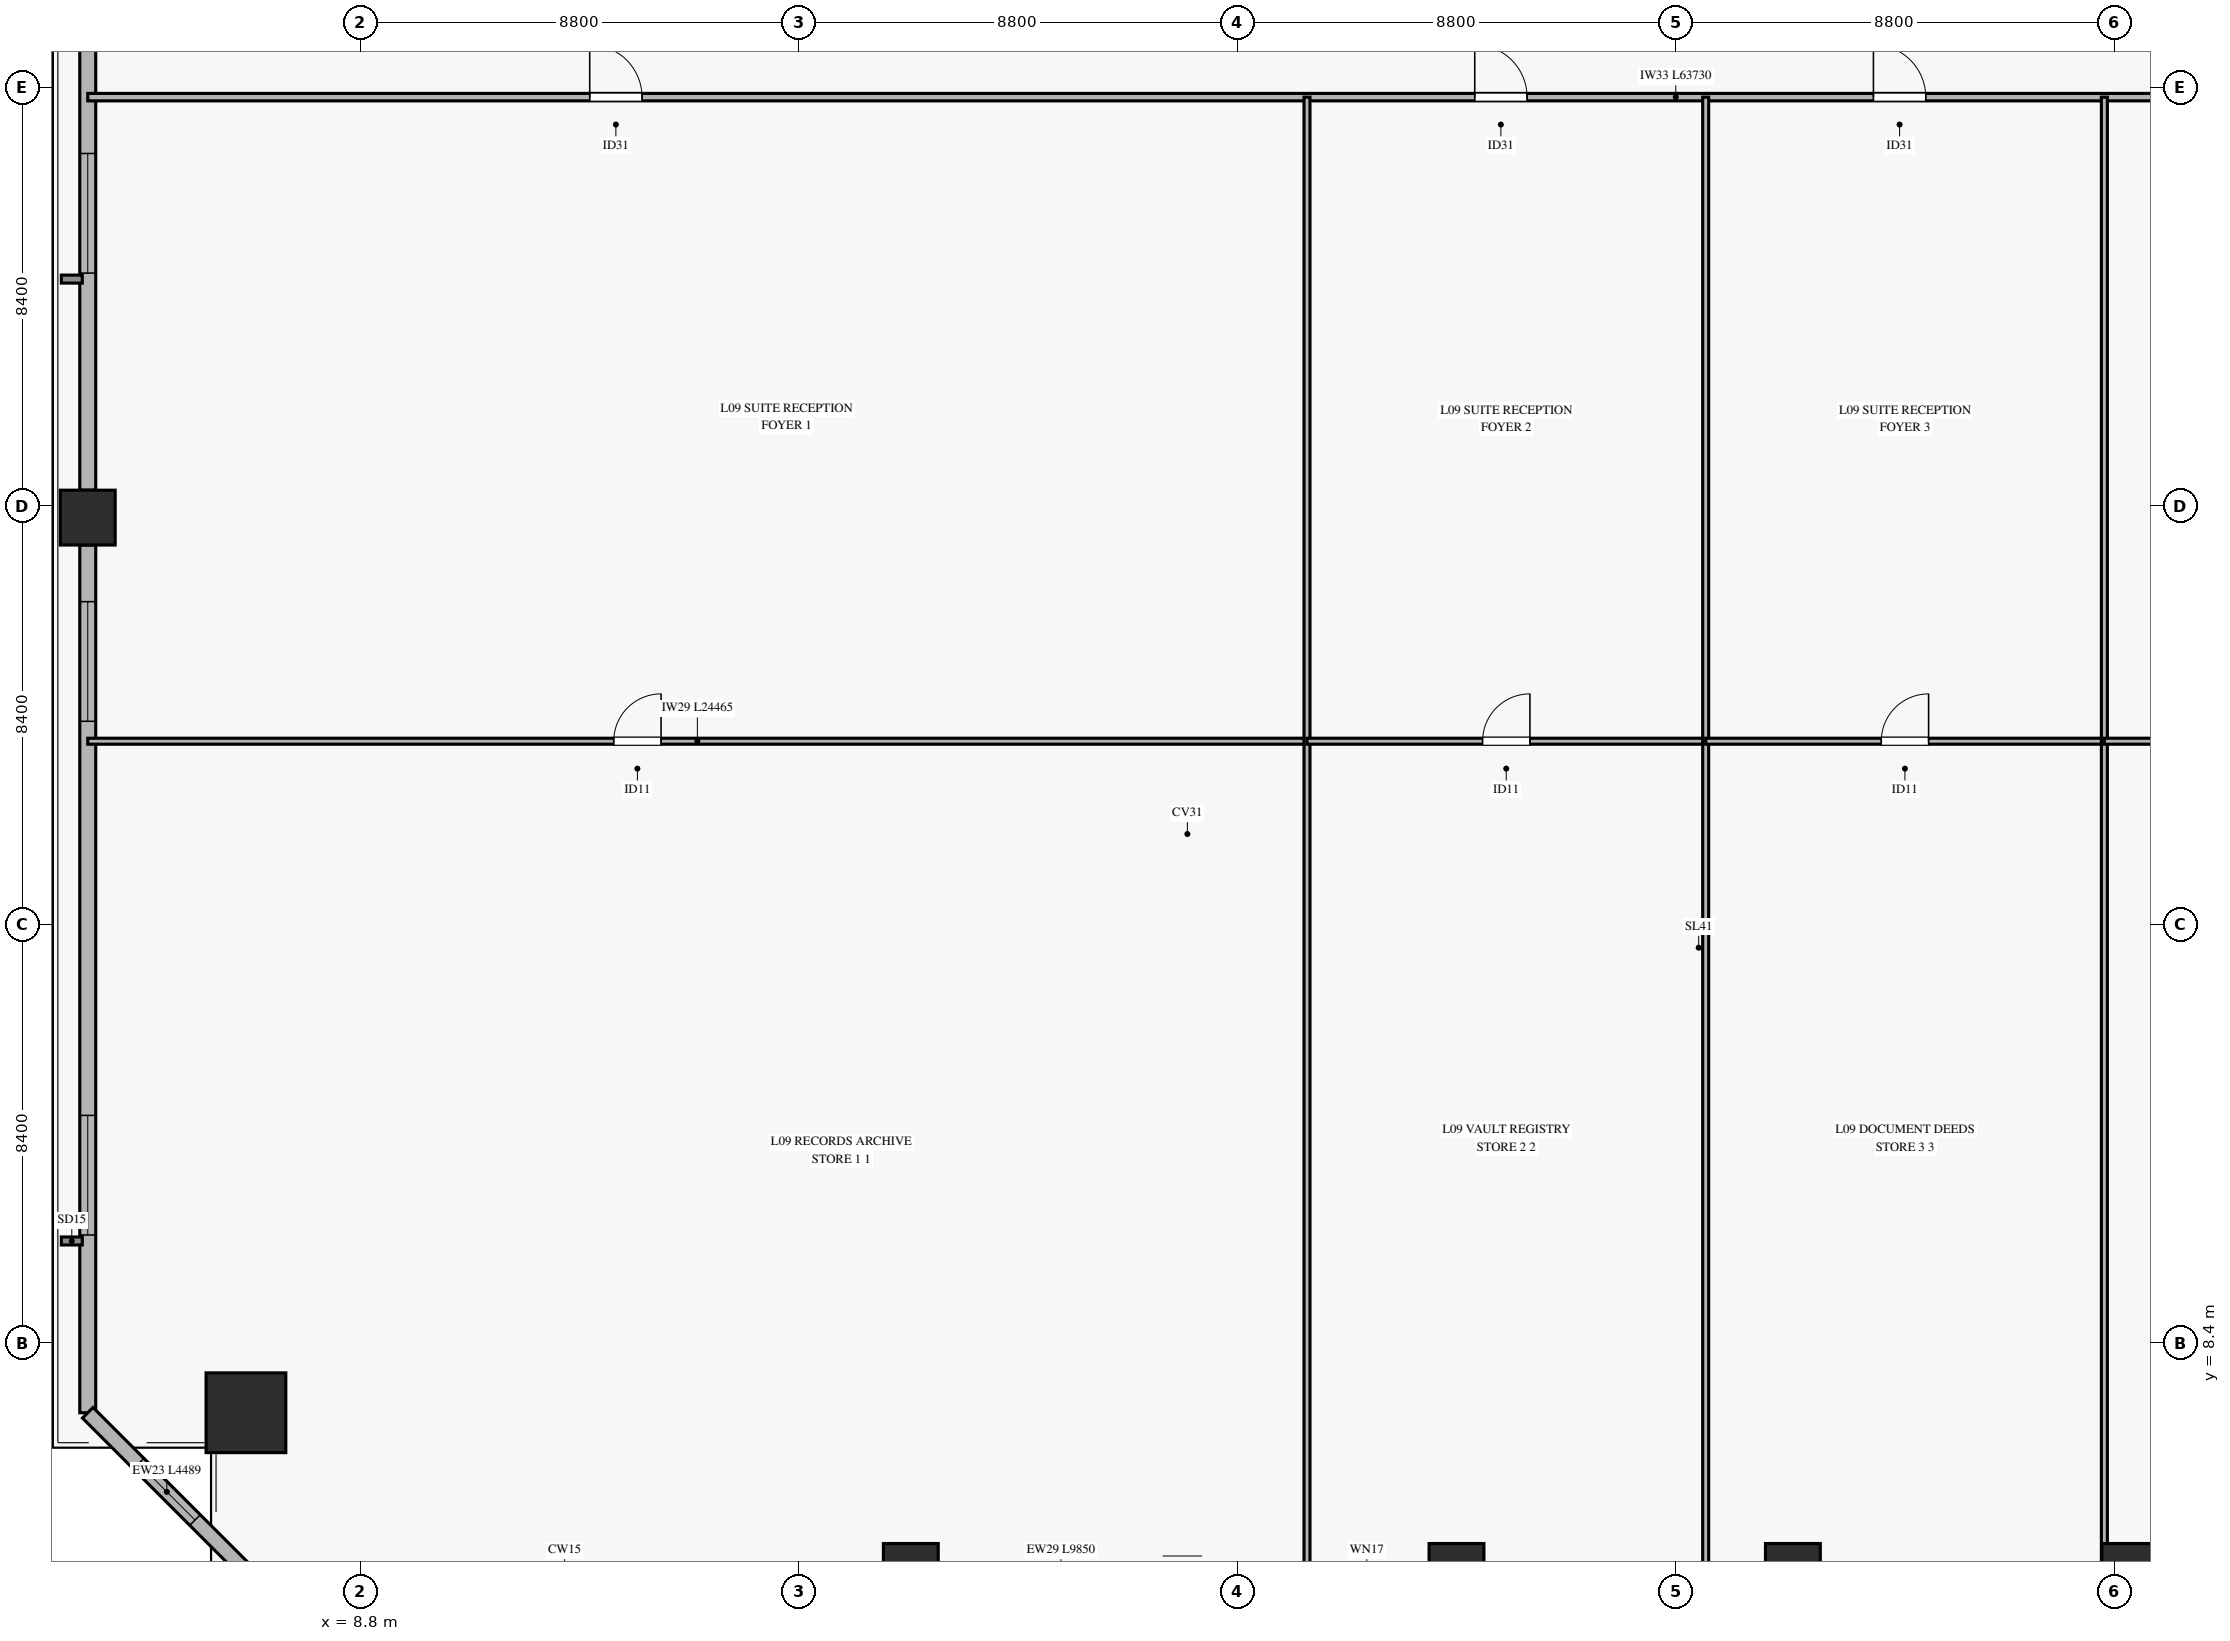
"""IFC4 building model, lengths in metres.
Left out: names, types, materials, properties, quantities, classifications, styles, units other than length and angle.
Written with IfcOpenShell. Run it as: python <this file> out.ifc"""

import sys

from ifc_helpers import new_model, si_unit, direction, frame, frame_2d, origin, origin_2d, place, context, subcontext, project, spatial, rectangle, hollow_rectangle, extrude, source, transform, mapped, element, fill, save


model = new_model("IFC4")
c1 = context("Model", 3, precision=1e-05, world=origin(), true_north=direction((0.0, 1.0)))
c2 = subcontext(c1, "Body", "Model", "MODEL_VIEW")
j1 = project(units=[si_unit("LENGTHUNIT", "METRE"), si_unit("PLANEANGLEUNIT", "RADIAN")], contexts=[c1])
p1 = place(None, origin())
s1 = spatial("IfcSite", under=j1, at=p1, CompositionType="ELEMENT")
p2 = place(p1, origin())
s2 = spatial("IfcBuilding", under=s1, at=p2, CompositionType="ELEMENT")
p3 = place(p2, frame((0.0, 0.0, 37.1)))
s3 = spatial("IfcBuildingStorey", under=s2, at=p3, CompositionType="ELEMENT", Elevation=37.1)
m1 = source(origin(), c2, "Body", "SweptSolid", [
    extrude(hollow_rectangle(XDim=1.6, YDim=1.6, WallThickness=0.075, at=origin_2d()), origin(), (0.0, 0.0, 1.0), 3.68),
])
p4 = place(p3, frame((6.509, 7.001, 0.0), z_axis=(0.0, 0.0, 1.0), x_axis=(1.0, 0.0, 0.0)))
e1 = element("IfcColumn", 1, at=p4, inside=s3, PredefinedType="COLUMN", context=c2, shape_type="MappedRepresentation", body=[
    mapped(m1, transform((0.0, 0.0, 0.0), x_axis=(1.0, 0.0, 0.0), y_axis=(0.0, 1.0, 0.0), z_axis=(0.0, 0.0, 1.0), scale=1.0)),
])
m2 = source(origin(), c2, "Body", "SweptSolid", [
    extrude(hollow_rectangle(XDim=1.1, YDim=1.1, WallThickness=0.05, at=origin_2d()), origin(), (0.0, 0.0, 1.0), 3.68),
])
for number, where, z_axis, x_axis in (
    (2, (19.85, 3.827, 0.0), (0.0, 0.0, 1.0), (1.0, 0.0, 0.0)),
    (3, (30.8, 3.827, 0.0), (0.0, 0.0, 1.0), (1.0, 0.0, 0.0)),
    (4, (37.55, 3.827, 0.0), (0.0, 0.0, 1.0), (1.0, 0.0, 0.0)),
    (5, (44.3, 3.827, 0.0), (0.0, 0.0, 1.0), (1.0, 0.0, 0.0)),
    (6, (3.335, 24.963, 0.0), (0.0, 0.0, 1.0), (1.0, 0.0, 0.0)),
):
    element("IfcColumn", number, at=place(p3, frame(where, z_axis=z_axis, x_axis=x_axis)), inside=s3, PredefinedType="COLUMN", context=c2, shape_type="MappedRepresentation", body=[
        mapped(m2, transform((0.0, 0.0, 0.0), x_axis=(1.0, 0.0, 0.0), y_axis=(0.0, 1.0, 0.0), z_axis=(0.0, 0.0, 1.0), scale=1.0)),
    ])
p5 = place(p3, frame((3.335, 7.001, 0.0), z_axis=(0.0, 0.0, 1.0), x_axis=(0.0, 1.0, 0.0)))
e7 = element("IfcWall", 7, at=p5, inside=s3, PredefinedType="SOLIDWALL", context=c2, shape_type="SweptSolid", body=[
    extrude(rectangle(XDim=17.412, YDim=0.32, at=frame_2d((8.706, 0.0))), origin(), (0.0, 0.0, 1.0), 3.16),
])
p6 = place(p5, frame((3.567, 0.0, 0.45)))
e8 = element("IfcOpeningElement", 8, at=p6, cuts=e7, PredefinedType="OPENING", context=c2, shape_type="SweptSolid", body=[
    extrude(rectangle(XDim=2.4, YDim=2.1, at=frame_2d((1.2, 1.05))), frame((0.0, 0.17, 0.0), z_axis=(0.0, -1.0, 0.0), x_axis=(1.0, 0.0, 0.0)), (0.0, 0.0, 1.0), 0.34),
])
p7 = place(p5, frame((13.875, 0.0, 0.45)))
e9 = element("IfcOpeningElement", 9, at=p7, cuts=e7, PredefinedType="OPENING", context=c2, shape_type="SweptSolid", body=[
    extrude(rectangle(XDim=2.4, YDim=2.1, at=frame_2d((1.2, 1.05))), frame((0.0, 0.17, 0.0), z_axis=(0.0, -1.0, 0.0), x_axis=(1.0, 0.0, 0.0)), (0.0, 0.0, 1.0), 0.34),
])
p8 = place(p3, frame((3.335, 25.513, 0.0), z_axis=(0.0, 0.0, 1.0), x_axis=(0.0, 1.0, 0.0)))
e10 = element("IfcWall", 10, at=p8, inside=s3, PredefinedType="SOLIDWALL", context=c2, shape_type="SweptSolid", body=[
    extrude(rectangle(XDim=17.413, YDim=0.32, at=frame_2d((8.707, 0.0))), origin(), (0.0, 0.0, 1.0), 3.16),
])
p9 = place(p8, frame((4.356, 0.0, 0.45)))
e11 = element("IfcOpeningElement", 11, at=p9, cuts=e10, PredefinedType="OPENING", context=c2, shape_type="SweptSolid", body=[
    extrude(rectangle(XDim=2.4, YDim=2.1, at=frame_2d((1.2, 1.05))), frame((0.0, 0.17, 0.0), z_axis=(0.0, -1.0, 0.0), x_axis=(1.0, 0.0, 0.0)), (0.0, 0.0, 1.0), 0.34),
])
p10 = place(p3, frame((3.335, 7.001, 0.0), z_axis=(0.0, 0.0, 1.0), x_axis=(0.707106781187, -0.707106781187, 0.0)))
e12 = element("IfcWall", 12, at=p10, inside=s3, PredefinedType="SOLIDWALL", context=c2, shape_type="SweptSolid", body=[
    extrude(rectangle(XDim=4.489, YDim=0.3, at=frame_2d((2.244, 0.0))), origin(), (0.0, 0.0, 1.0), 3.16),
])
p11 = place(p10, frame((1.444, 0.0, 0.45)))
e13 = element("IfcOpeningElement", 13, at=p11, cuts=e12, PredefinedType="OPENING", context=c2, shape_type="SweptSolid", body=[
    extrude(rectangle(XDim=1.6, YDim=2.0, at=frame_2d((0.8, 1.0))), frame((0.0, 0.16, 0.0), z_axis=(0.0, -1.0, 0.0), x_axis=(1.0, 0.0, 0.0)), (0.0, 0.0, 1.0), 0.32),
])
p12 = place(p3, frame((3.335, 33.4, 0.0), z_axis=(0.0, 0.0, 1.0), x_axis=(1.0, 0.0, 0.0)))
e14 = element("IfcWall", 14, at=p12, inside=s3, PredefinedType="PARTITIONING", context=c2, shape_type="SweptSolid", body=[
    extrude(rectangle(XDim=63.73, YDim=0.15, at=frame_2d((31.865, 0.0))), origin(), (0.0, 0.0, 1.0), 2.765),
])
p13 = place(p12, frame((10.072, 0.0, 0.0)))
e15 = element("IfcOpeningElement", 15, at=p13, cuts=e14, PredefinedType="OPENING", context=c2, shape_type="SweptSolid", body=[
    extrude(rectangle(XDim=1.05, YDim=2.15, at=frame_2d((0.525, 1.075))), frame((0.0, 0.085, 0.0), z_axis=(0.0, -1.0, 0.0), x_axis=(1.0, 0.0, 0.0)), (0.0, 0.0, 1.0), 0.17),
])
p14 = place(p12, frame((27.831, 0.0, 0.0)))
e16 = element("IfcOpeningElement", 16, at=p14, cuts=e14, PredefinedType="OPENING", context=c2, shape_type="SweptSolid", body=[
    extrude(rectangle(XDim=1.05, YDim=2.15, at=frame_2d((0.525, 1.075))), frame((0.0, 0.085, 0.0), z_axis=(0.0, -1.0, 0.0), x_axis=(1.0, 0.0, 0.0)), (0.0, 0.0, 1.0), 0.17),
])
p15 = place(p12, frame((35.831, 0.0, 0.0)))
e17 = element("IfcOpeningElement", 17, at=p15, cuts=e14, PredefinedType="OPENING", context=c2, shape_type="SweptSolid", body=[
    extrude(rectangle(XDim=1.05, YDim=2.15, at=frame_2d((0.525, 1.075))), frame((0.0, 0.085, 0.0), z_axis=(0.0, -1.0, 0.0), x_axis=(1.0, 0.0, 0.0)), (0.0, 0.0, 1.0), 0.17),
])
p16 = place(p12, frame((49.857, 0.0, 0.0)))
e18 = element("IfcOpeningElement", 18, at=p16, cuts=e14, PredefinedType="OPENING", context=c2, shape_type="SweptSolid", body=[
    extrude(rectangle(XDim=1.05, YDim=2.15, at=frame_2d((0.525, 1.075))), frame((0.0, 0.085, 0.0), z_axis=(0.0, -1.0, 0.0), x_axis=(1.0, 0.0, 0.0)), (0.0, 0.0, 1.0), 0.17),
])
p17 = place(p3, frame((3.335, 20.476, 0.0), z_axis=(0.0, 0.0, 1.0), x_axis=(1.0, 0.0, 0.0)))
e19 = element("IfcWall", 19, at=p17, inside=s3, PredefinedType="PARTITIONING", context=c2, shape_type="SweptSolid", body=[
    extrude(rectangle(XDim=24.465, YDim=0.12, at=frame_2d((12.232, 0.0))), origin(), (0.0, 0.0, 1.0), 2.765),
])
p18 = place(p17, frame((10.554, 0.0, 0.0)))
e20 = element("IfcOpeningElement", 20, at=p18, cuts=e19, PredefinedType="OPENING", context=c2, shape_type="SweptSolid", body=[
    extrude(rectangle(XDim=0.95, YDim=2.1, at=frame_2d((0.475, 1.05))), frame((0.0, 0.07, 0.0), z_axis=(0.0, -1.0, 0.0), x_axis=(1.0, 0.0, 0.0)), (0.0, 0.0, 1.0), 0.14),
])
p19 = place(p3, frame((27.8, 3.827, 0.0), z_axis=(0.0, 0.0, 1.0), x_axis=(0.0, 1.0, 0.0)))
e21 = element("IfcWall", 21, at=p19, inside=s3, PredefinedType="PARTITIONING", context=c2, shape_type="SweptSolid", body=[
    extrude(rectangle(XDim=29.573, YDim=0.12, at=frame_2d((14.787, 0.0))), origin(), (0.0, 0.0, 1.0), 3.165),
])
p20 = place(p3, frame((27.8, 20.476, 0.0), z_axis=(0.0, 0.0, 1.0), x_axis=(1.0, 0.0, 0.0)))
e22 = element("IfcWall", 22, at=p20, inside=s3, PredefinedType="PARTITIONING", context=c2, shape_type="SweptSolid", body=[
    extrude(rectangle(XDim=8.0, YDim=0.12, at=frame_2d((4.0, 0.0))), origin(), (0.0, 0.0, 1.0), 2.765),
])
p21 = place(p20, frame((3.523, 0.0, 0.0)))
e23 = element("IfcOpeningElement", 23, at=p21, cuts=e22, PredefinedType="OPENING", context=c2, shape_type="SweptSolid", body=[
    extrude(rectangle(XDim=0.95, YDim=2.1, at=frame_2d((0.475, 1.05))), frame((0.0, 0.07, 0.0), z_axis=(0.0, -1.0, 0.0), x_axis=(1.0, 0.0, 0.0)), (0.0, 0.0, 1.0), 0.14),
])
p22 = place(p3, frame((35.8, 3.827, 0.0), z_axis=(0.0, 0.0, 1.0), x_axis=(0.0, 1.0, 0.0)))
e24 = element("IfcWall", 24, at=p22, inside=s3, PredefinedType="PARTITIONING", context=c2, shape_type="SweptSolid", body=[
    extrude(rectangle(XDim=29.573, YDim=0.12, at=frame_2d((14.787, 0.0))), origin(), (0.0, 0.0, 1.0), 3.165),
])
p23 = place(p3, frame((35.8, 20.476, 0.0), z_axis=(0.0, 0.0, 1.0), x_axis=(1.0, 0.0, 0.0)))
e25 = element("IfcWall", 25, at=p23, inside=s3, PredefinedType="PARTITIONING", context=c2, shape_type="SweptSolid", body=[
    extrude(rectangle(XDim=8.0, YDim=0.12, at=frame_2d((4.0, 0.0))), origin(), (0.0, 0.0, 1.0), 2.765),
])
p24 = place(p23, frame((3.523, 0.0, 0.0)))
e26 = element("IfcOpeningElement", 26, at=p24, cuts=e25, PredefinedType="OPENING", context=c2, shape_type="SweptSolid", body=[
    extrude(rectangle(XDim=0.95, YDim=2.1, at=frame_2d((0.475, 1.05))), frame((0.0, 0.07, 0.0), z_axis=(0.0, -1.0, 0.0), x_axis=(1.0, 0.0, 0.0)), (0.0, 0.0, 1.0), 0.14),
])
p25 = place(p3, frame((43.8, 3.827, 0.0), z_axis=(0.0, 0.0, 1.0), x_axis=(0.0, 1.0, 0.0)))
e27 = element("IfcWall", 27, at=p25, inside=s3, PredefinedType="PARTITIONING", context=c2, shape_type="SweptSolid", body=[
    extrude(rectangle(XDim=29.573, YDim=0.12, at=frame_2d((14.787, 0.0))), origin(), (0.0, 0.0, 1.0), 3.215),
])
p26 = place(p3, frame((43.8, 20.476, 0.0), z_axis=(0.0, 0.0, 1.0), x_axis=(1.0, 0.0, 0.0)))
e28 = element("IfcWall", 28, at=p26, inside=s3, PredefinedType="PARTITIONING", context=c2, shape_type="SweptSolid", body=[
    extrude(rectangle(XDim=23.265, YDim=0.12, at=frame_2d((11.632, 0.0))), origin(), (0.0, 0.0, 1.0), 2.765),
])
p27 = place(p26, frame((9.85, 0.0, 0.0)))
e29 = element("IfcOpeningElement", 29, at=p27, cuts=e28, PredefinedType="OPENING", context=c2, shape_type="SweptSolid", body=[
    extrude(rectangle(XDim=0.95, YDim=2.1, at=frame_2d((0.475, 1.05))), frame((0.0, 0.07, 0.0), z_axis=(0.0, -1.0, 0.0), x_axis=(1.0, 0.0, 0.0)), (0.0, 0.0, 1.0), 0.14),
])
m3 = source(origin(), c2, "Body", "SweptSolid", [
    extrude(rectangle(XDim=2.4, YDim=2.1, at=frame_2d((1.2, 1.05))), frame((0.0, 0.03, 0.0), z_axis=(0.0, -1.0, 0.0), x_axis=(1.0, 0.0, 0.0)), (0.0, 0.0, 1.0), 0.06),
])
p28 = place(p6, origin())
e30 = element("IfcWindow", 30, at=p28, inside=s3, PartitioningType="SINGLE_PANEL", PredefinedType="WINDOW", context=c2, shape_type="MappedRepresentation", body=[
    mapped(m3, transform((0.0, 0.0, 0.0), x_axis=(1.0, 0.0, 0.0), y_axis=(0.0, 1.0, 0.0), z_axis=(0.0, 0.0, 1.0), scale=1.0)),
])
fill(e8, e30)
p29 = place(p7, origin())
e31 = element("IfcWindow", 31, at=p29, inside=s3, PartitioningType="SINGLE_PANEL", PredefinedType="WINDOW", context=c2, shape_type="MappedRepresentation", body=[
    mapped(m3, transform((0.0, 0.0, 0.0), x_axis=(1.0, 0.0, 0.0), y_axis=(0.0, 1.0, 0.0), z_axis=(0.0, 0.0, 1.0), scale=1.0)),
])
fill(e9, e31)
p30 = place(p9, origin())
e32 = element("IfcWindow", 32, at=p30, inside=s3, PartitioningType="SINGLE_PANEL", PredefinedType="WINDOW", context=c2, shape_type="MappedRepresentation", body=[
    mapped(m3, transform((0.0, 0.0, 0.0), x_axis=(1.0, 0.0, 0.0), y_axis=(0.0, 1.0, 0.0), z_axis=(0.0, 0.0, 1.0), scale=1.0)),
])
fill(e11, e32)
m4 = source(origin(), c2, "Body", "SweptSolid", [
    extrude(rectangle(XDim=1.6, YDim=2.0, at=frame_2d((0.8, 1.0))), frame((0.0, 0.03, 0.0), z_axis=(0.0, -1.0, 0.0), x_axis=(1.0, 0.0, 0.0)), (0.0, 0.0, 1.0), 0.06),
])
p31 = place(p11, origin())
e33 = element("IfcWindow", 33, at=p31, inside=s3, PartitioningType="SINGLE_PANEL", PredefinedType="WINDOW", context=c2, shape_type="MappedRepresentation", body=[
    mapped(m4, transform((0.0, 0.0, 0.0), x_axis=(1.0, 0.0, 0.0), y_axis=(0.0, 1.0, 0.0), z_axis=(0.0, 0.0, 1.0), scale=1.0)),
])
fill(e13, e33)
m5 = source(origin(), c2, "Body", "SweptSolid", [
    extrude(rectangle(XDim=1.05, YDim=2.15, at=frame_2d((0.525, 1.075))), frame((0.0, 0.025, 0.0), z_axis=(0.0, -1.0, 0.0), x_axis=(1.0, 0.0, 0.0)), (0.0, 0.0, 1.0), 0.05),
])
p32 = place(p13, origin())
e34 = element("IfcDoor", 34, at=p32, inside=s3, OperationType="SINGLE_SWING_LEFT", PredefinedType="DOOR", context=c2, shape_type="MappedRepresentation", body=[
    mapped(m5, transform((0.0, 0.0, 0.0), x_axis=(1.0, 0.0, 0.0), y_axis=(0.0, 1.0, 0.0), z_axis=(0.0, 0.0, 1.0), scale=1.0)),
])
fill(e15, e34)
m6 = source(origin(), c2, "Body", "SweptSolid", [
    extrude(rectangle(XDim=0.95, YDim=2.1, at=frame_2d((0.475, 1.05))), frame((0.0, 0.025, 0.0), z_axis=(0.0, -1.0, 0.0), x_axis=(1.0, 0.0, 0.0)), (0.0, 0.0, 1.0), 0.05),
])
p33 = place(p18, origin())
e35 = element("IfcDoor", 35, at=p33, inside=s3, OperationType="SINGLE_SWING_RIGHT", PredefinedType="DOOR", context=c2, shape_type="MappedRepresentation", body=[
    mapped(m6, transform((0.0, 0.0, 0.0), x_axis=(1.0, 0.0, 0.0), y_axis=(0.0, 1.0, 0.0), z_axis=(0.0, 0.0, 1.0), scale=1.0)),
])
fill(e20, e35)
p34 = place(p14, origin())
e36 = element("IfcDoor", 36, at=p34, inside=s3, OperationType="SINGLE_SWING_LEFT", PredefinedType="DOOR", context=c2, shape_type="MappedRepresentation", body=[
    mapped(m5, transform((0.0, 0.0, 0.0), x_axis=(1.0, 0.0, 0.0), y_axis=(0.0, 1.0, 0.0), z_axis=(0.0, 0.0, 1.0), scale=1.0)),
])
fill(e16, e36)
p35 = place(p21, origin())
e37 = element("IfcDoor", 37, at=p35, inside=s3, OperationType="SINGLE_SWING_RIGHT", PredefinedType="DOOR", context=c2, shape_type="MappedRepresentation", body=[
    mapped(m6, transform((0.0, 0.0, 0.0), x_axis=(1.0, 0.0, 0.0), y_axis=(0.0, 1.0, 0.0), z_axis=(0.0, 0.0, 1.0), scale=1.0)),
])
fill(e23, e37)
p36 = place(p15, origin())
e38 = element("IfcDoor", 38, at=p36, inside=s3, OperationType="SINGLE_SWING_LEFT", PredefinedType="DOOR", context=c2, shape_type="MappedRepresentation", body=[
    mapped(m5, transform((0.0, 0.0, 0.0), x_axis=(1.0, 0.0, 0.0), y_axis=(0.0, 1.0, 0.0), z_axis=(0.0, 0.0, 1.0), scale=1.0)),
])
fill(e17, e38)
p37 = place(p24, origin())
e39 = element("IfcDoor", 39, at=p37, inside=s3, OperationType="SINGLE_SWING_RIGHT", PredefinedType="DOOR", context=c2, shape_type="MappedRepresentation", body=[
    mapped(m6, transform((0.0, 0.0, 0.0), x_axis=(1.0, 0.0, 0.0), y_axis=(0.0, 1.0, 0.0), z_axis=(0.0, 0.0, 1.0), scale=1.0)),
])
fill(e26, e39)
save(model, sys.argv[1])
